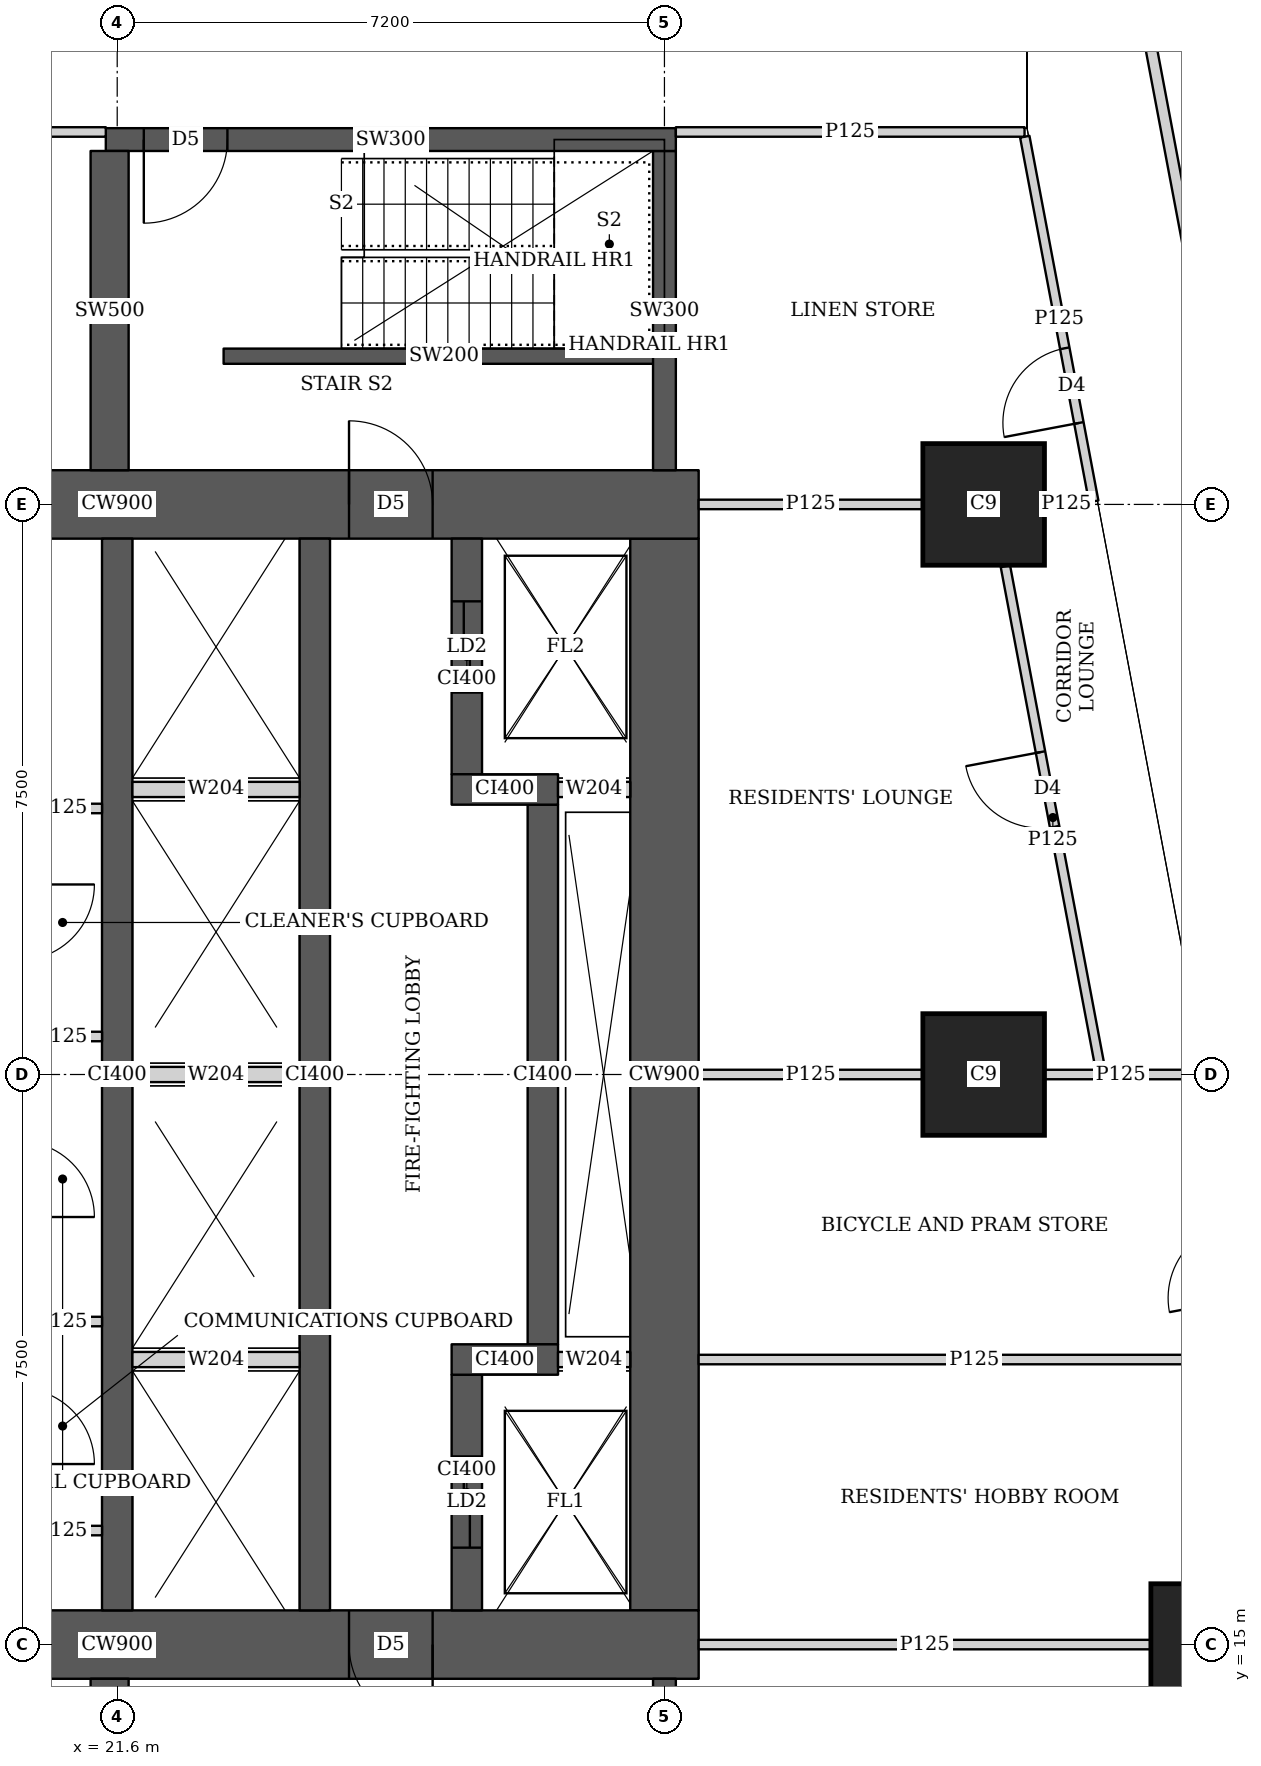
"""IFC4 building model, lengths in metres.
Left out: names, types, materials, properties, quantities, classifications, styles, units other than length and angle.
Written with IfcOpenShell. Run it as: python <this file> out.ifc"""

import sys

from ifc_helpers import new_model, si_unit, direction, frame, frame_2d, origin, origin_2d, place, context, subcontext, project, spatial, rectangle, extrude, element, fill, save


model = new_model("IFC4")
c1 = context("Model", 3, precision=1e-05, world=origin(), true_north=direction((0.0, 1.0)))
c2 = subcontext(c1, "Body", "Model", "MODEL_VIEW")
j1 = project(units=[si_unit("LENGTHUNIT", "METRE"), si_unit("PLANEANGLEUNIT", "RADIAN")], contexts=[c1])
p1 = place(None, origin())
s1 = spatial("IfcSite", under=j1, at=p1, CompositionType="ELEMENT")
p2 = place(p1, origin())
s2 = spatial("IfcBuilding", under=s1, at=p2, CompositionType="ELEMENT")
p3 = place(p2, frame((0.0, 0.0, 81.65)))
s3 = spatial("IfcBuildingStorey", under=s2, at=p3, CompositionType="ELEMENT", Elevation=81.65)
for number, where, z_axis, x_axis in (
    (1, (36.0, 15.0, 0.0), (0.0, 0.0, 1.0), (1.0, 0.0, 0.0)),
    (2, (33.0, 22.5, 0.0), (0.0, 0.0, 1.0), (1.0, 0.0, 0.0)),
    (3, (33.0, 30.0, 0.0), (0.0, 0.0, 1.0), (1.0, 0.0, 0.0)),
):
    element("IfcColumn", number, at=place(p3, frame(where, z_axis=z_axis, x_axis=x_axis)), inside=s3, PredefinedType="COLUMN", context=c2, shape_type="SweptSolid", body=[
        extrude(rectangle(XDim=1.6, YDim=1.6, at=origin_2d()), origin(), (0.0, 0.0, 1.0), 3.75),
    ])
p4 = place(p3, frame((13.95, 15.0, 0.0), z_axis=(0.0, 0.0, 1.0), x_axis=(1.0, 0.0, 0.0)))
e4 = element("IfcWall", 4, at=p4, inside=s3, PredefinedType="SHEAR", context=c2, shape_type="SweptSolid", body=[
    extrude(rectangle(XDim=15.3, YDim=0.9, at=frame_2d((7.65, 0.0))), origin(), (0.0, 0.0, 1.0), 3.75),
])
p5 = place(p4, frame((4.45, 0.0, 0.0)))
e5 = element("IfcOpeningElement", 5, at=p5, cuts=e4, PredefinedType="OPENING", context=c2, shape_type="SweptSolid", body=[
    extrude(rectangle(XDim=1.8, YDim=2.1, at=frame_2d((0.9, 1.05))), frame((0.0, 0.46, 0.0), z_axis=(0.0, -1.0, 0.0), x_axis=(1.0, 0.0, 0.0)), (0.0, 0.0, 1.0), 0.92),
])
p6 = place(p4, frame((10.7, 0.0, 0.0)))
e6 = element("IfcOpeningElement", 6, at=p6, cuts=e4, PredefinedType="OPENING", context=c2, shape_type="SweptSolid", body=[
    extrude(rectangle(XDim=1.1, YDim=2.1, at=frame_2d((0.55, 1.05))), frame((0.0, 0.46, 0.0), z_axis=(0.0, -1.0, 0.0), x_axis=(1.0, 0.0, 0.0)), (0.0, 0.0, 1.0), 0.92),
])
p7 = place(p3, frame((13.95, 30.0, 0.0), z_axis=(0.0, 0.0, 1.0), x_axis=(1.0, 0.0, 0.0)))
e7 = element("IfcWall", 7, at=p7, inside=s3, PredefinedType="SHEAR", context=c2, shape_type="SweptSolid", body=[
    extrude(rectangle(XDim=15.3, YDim=0.9, at=frame_2d((7.65, 0.0))), origin(), (0.0, 0.0, 1.0), 3.75),
])
p8 = place(p7, frame((4.45, 0.0, 0.0)))
e8 = element("IfcOpeningElement", 8, at=p8, cuts=e7, PredefinedType="OPENING", context=c2, shape_type="SweptSolid", body=[
    extrude(rectangle(XDim=1.8, YDim=2.1, at=frame_2d((0.9, 1.05))), frame((0.0, 0.46, 0.0), z_axis=(0.0, -1.0, 0.0), x_axis=(1.0, 0.0, 0.0)), (0.0, 0.0, 1.0), 0.92),
])
p9 = place(p7, frame((10.7, 0.0, 0.0)))
e9 = element("IfcOpeningElement", 9, at=p9, cuts=e7, PredefinedType="OPENING", context=c2, shape_type="SweptSolid", body=[
    extrude(rectangle(XDim=1.1, YDim=2.1, at=frame_2d((0.55, 1.05))), frame((0.0, 0.46, 0.0), z_axis=(0.0, -1.0, 0.0), x_axis=(1.0, 0.0, 0.0)), (0.0, 0.0, 1.0), 0.92),
])
p10 = place(p3, frame((28.8, 15.45, 0.0), z_axis=(0.0, 0.0, 1.0), x_axis=(0.0, 1.0, 0.0)))
e10 = element("IfcWall", 10, at=p10, inside=s3, PredefinedType="SHEAR", context=c2, shape_type="SweptSolid", body=[
    extrude(rectangle(XDim=14.1, YDim=0.9, at=frame_2d((7.05, 0.0))), origin(), (0.0, 0.0, 1.0), 3.75),
])
for number, where, z_axis, x_axis in (
    (11, (21.6, 15.45, 0.0), (0.0, 0.0, 1.0), (0.0, 1.0, 0.0)),
    (12, (24.2, 15.45, 0.0), (0.0, 0.0, 1.0), (0.0, 1.0, 0.0)),
):
    element("IfcWall", number, at=place(p3, frame(where, z_axis=z_axis, x_axis=x_axis)), inside=s3, PredefinedType="SHEAR", context=c2, shape_type="SweptSolid", body=[
        extrude(rectangle(XDim=14.1, YDim=0.4, at=frame_2d((7.05, 0.0))), origin(), (0.0, 0.0, 1.0), 3.75),
    ])
p11 = place(p3, frame((26.2, 15.45, 0.0), z_axis=(0.0, 0.0, 1.0), x_axis=(0.0, 1.0, 0.0)))
e13 = element("IfcWall", 13, at=p11, inside=s3, PredefinedType="SHEAR", context=c2, shape_type="SweptSolid", body=[
    extrude(rectangle(XDim=3.1, YDim=0.4, at=frame_2d((1.55, 0.0))), origin(), (0.0, 0.0, 1.0), 3.75),
])
p12 = place(p11, frame((0.825, 0.0, 0.0)))
e14 = element("IfcOpeningElement", 14, at=p12, cuts=e13, PredefinedType="OPENING", context=c2, shape_type="SweptSolid", body=[
    extrude(rectangle(XDim=1.2, YDim=2.1, at=frame_2d((0.6, 1.05))), frame((0.0, 0.21, 0.0), z_axis=(0.0, -1.0, 0.0), x_axis=(1.0, 0.0, 0.0)), (0.0, 0.0, 1.0), 0.42),
])
p13 = place(p3, frame((26.0, 18.75, 0.0), z_axis=(0.0, 0.0, 1.0), x_axis=(1.0, 0.0, 0.0)))
e15 = element("IfcWall", 15, at=p13, inside=s3, PredefinedType="SHEAR", context=c2, shape_type="SweptSolid", body=[
    extrude(rectangle(XDim=1.4, YDim=0.4, at=frame_2d((0.7, 0.0))), origin(), (0.0, 0.0, 1.0), 3.75),
])
p14 = place(p3, frame((27.2, 18.95, 0.0), z_axis=(0.0, 0.0, 1.0), x_axis=(0.0, 1.0, 0.0)))
e16 = element("IfcWall", 16, at=p14, inside=s3, PredefinedType="SHEAR", context=c2, shape_type="SweptSolid", body=[
    extrude(rectangle(XDim=7.1, YDim=0.4, at=frame_2d((3.55, 0.0))), origin(), (0.0, 0.0, 1.0), 3.75),
])
p15 = place(p3, frame((26.0, 26.25, 0.0), z_axis=(0.0, 0.0, 1.0), x_axis=(1.0, 0.0, 0.0)))
e17 = element("IfcWall", 17, at=p15, inside=s3, PredefinedType="SHEAR", context=c2, shape_type="SweptSolid", body=[
    extrude(rectangle(XDim=1.4, YDim=0.4, at=frame_2d((0.7, 0.0))), origin(), (0.0, 0.0, 1.0), 3.75),
])
p16 = place(p3, frame((26.2, 26.45, 0.0), z_axis=(0.0, 0.0, 1.0), x_axis=(0.0, 1.0, 0.0)))
e18 = element("IfcWall", 18, at=p16, inside=s3, PredefinedType="SHEAR", context=c2, shape_type="SweptSolid", body=[
    extrude(rectangle(XDim=3.1, YDim=0.4, at=frame_2d((1.55, 0.0))), origin(), (0.0, 0.0, 1.0), 3.75),
])
p17 = place(p16, frame((1.075, 0.0, 0.0)))
e19 = element("IfcOpeningElement", 19, at=p17, cuts=e18, PredefinedType="OPENING", context=c2, shape_type="SweptSolid", body=[
    extrude(rectangle(XDim=1.2, YDim=2.1, at=frame_2d((0.6, 1.05))), frame((0.0, 0.21, 0.0), z_axis=(0.0, -1.0, 0.0), x_axis=(1.0, 0.0, 0.0)), (0.0, 0.0, 1.0), 0.42),
])
p18 = place(p3, frame((21.5, 10.35, 0.0), z_axis=(0.0, 0.0, 1.0), x_axis=(0.0, 1.0, 0.0)))
e20 = element("IfcWall", 20, at=p18, inside=s3, PredefinedType="SHEAR", context=c2, shape_type="SweptSolid", body=[
    extrude(rectangle(XDim=4.2, YDim=0.5, at=frame_2d((2.1, 0.0))), origin(), (0.0, 0.0, 1.0), 3.75),
])
p19 = place(p3, frame((28.8, 10.35, 0.0), z_axis=(0.0, 0.0, 1.0), x_axis=(0.0, 1.0, 0.0)))
e21 = element("IfcWall", 21, at=p19, inside=s3, PredefinedType="SHEAR", context=c2, shape_type="SweptSolid", body=[
    extrude(rectangle(XDim=4.2, YDim=0.3, at=frame_2d((2.1, 0.0))), origin(), (0.0, 0.0, 1.0), 3.75),
])
p20 = place(p3, frame((21.45, 34.8, 0.0), z_axis=(0.0, 0.0, 1.0), x_axis=(1.0, 0.0, 0.0)))
e22 = element("IfcWall", 22, at=p20, inside=s3, PredefinedType="SHEAR", context=c2, shape_type="SweptSolid", body=[
    extrude(rectangle(XDim=7.5, YDim=0.3, at=frame_2d((3.75, 0.0))), origin(), (0.0, 0.0, 1.0), 3.75),
])
p21 = place(p20, frame((0.5, 0.0, 0.0)))
e23 = element("IfcOpeningElement", 23, at=p21, cuts=e22, PredefinedType="OPENING", context=c2, shape_type="SweptSolid", body=[
    extrude(rectangle(XDim=1.1, YDim=2.1, at=frame_2d((0.55, 1.05))), frame((0.0, 0.16, 0.0), z_axis=(0.0, -1.0, 0.0), x_axis=(1.0, 0.0, 0.0)), (0.0, 0.0, 1.0), 0.32),
])
p22 = place(p3, frame((21.5, 30.45, 0.0), z_axis=(0.0, 0.0, 1.0), x_axis=(0.0, 1.0, 0.0)))
e24 = element("IfcWall", 24, at=p22, inside=s3, PredefinedType="SHEAR", context=c2, shape_type="SweptSolid", body=[
    extrude(rectangle(XDim=4.2, YDim=0.5, at=frame_2d((2.1, 0.0))), origin(), (0.0, 0.0, 1.0), 3.75),
])
p23 = place(p3, frame((28.8, 30.45, 0.0), z_axis=(0.0, 0.0, 1.0), x_axis=(0.0, 1.0, 0.0)))
e25 = element("IfcWall", 25, at=p23, inside=s3, PredefinedType="SHEAR", context=c2, shape_type="SweptSolid", body=[
    extrude(rectangle(XDim=4.2, YDim=0.3, at=frame_2d((2.1, 0.0))), origin(), (0.0, 0.0, 1.0), 3.75),
])
p24 = place(p3, frame((33.382, 45.65, 0.0), z_axis=(0.0, 0.0, 1.0), x_axis=(0.185593544777, -0.982626600565, 0.0)))
e26 = element("IfcWall", 26, at=p24, inside=s3, PredefinedType="SOLIDWALL", context=c2, shape_type="SweptSolid", body=[
    extrude(rectangle(XDim=47.118, YDim=0.15, at=frame_2d((23.559, 0.0))), origin(), (0.0, 0.0, 1.0), 2.2),
])
p25 = place(p24, frame((19.054, 0.0, 0.0)))
e27 = element("IfcOpeningElement", 27, at=p25, cuts=e26, PredefinedType="OPENING", context=c2, shape_type="SweptSolid", body=[
    extrude(rectangle(XDim=1.0, YDim=2.1, at=frame_2d((0.5, 1.05))), frame((0.0, 0.085, 0.0), z_axis=(0.0, -1.0, 0.0), x_axis=(1.0, 0.0, 0.0)), (0.0, 0.0, 1.0), 0.17),
])
p26 = place(p24, frame((22.87, 0.0, 0.0)))
e28 = element("IfcOpeningElement", 28, at=p26, cuts=e26, PredefinedType="OPENING", context=c2, shape_type="SweptSolid", body=[
    extrude(rectangle(XDim=1.0, YDim=2.1, at=frame_2d((0.5, 1.05))), frame((0.0, 0.085, 0.0), z_axis=(0.0, -1.0, 0.0), x_axis=(1.0, 0.0, 0.0)), (0.0, 0.0, 1.0), 0.17),
])
p27 = place(p24, frame((33.833, 0.0, 0.0)))
e29 = element("IfcOpeningElement", 29, at=p27, cuts=e26, PredefinedType="OPENING", context=c2, shape_type="SweptSolid", body=[
    extrude(rectangle(XDim=1.0, YDim=2.1, at=frame_2d((0.5, 1.05))), frame((0.0, 0.085, 0.0), z_axis=(0.0, -1.0, 0.0), x_axis=(1.0, 0.0, 0.0)), (0.0, 0.0, 1.0), 0.17),
])
p28 = place(p3, frame((10.163, 34.9, 0.0), z_axis=(0.0, 0.0, 1.0), x_axis=(1.0, 0.0, 0.0)))
e30 = element("IfcWall", 30, at=p28, inside=s3, PredefinedType="PARTITIONING", context=c2, shape_type="SweptSolid", body=[
    extrude(rectangle(XDim=11.287, YDim=0.125, at=frame_2d((5.644, 0.0))), origin(), (0.0, 0.0, 1.0), 3.5),
])
p29 = place(p28, frame((7.737, 0.0, 0.0)))
e31 = element("IfcOpeningElement", 31, at=p29, cuts=e30, PredefinedType="OPENING", context=c2, shape_type="SweptSolid", body=[
    extrude(rectangle(XDim=1.8, YDim=2.1, at=frame_2d((0.9, 1.05))), frame((0.0, 0.073, 0.0), z_axis=(0.0, -1.0, 0.0), x_axis=(1.0, 0.0, 0.0)), (0.0, 0.0, 1.0), 0.145),
])
p30 = place(p3, frame((28.95, 34.9, 0.0), z_axis=(0.0, 0.0, 1.0), x_axis=(1.0, 0.0, 0.0)))
e32 = element("IfcWall", 32, at=p30, inside=s3, PredefinedType="PARTITIONING", context=c2, shape_type="SweptSolid", body=[
    extrude(rectangle(XDim=4.588, YDim=0.125, at=frame_2d((2.294, 0.0))), origin(), (0.0, 0.0, 1.0), 3.5),
])
p31 = place(p3, frame((34.448, 30.04, 0.0), z_axis=(0.0, 0.0, 1.0), x_axis=(-0.185749459238, 0.982597139418, 0.0)))
e33 = element("IfcWall", 33, at=p31, inside=s3, PredefinedType="PARTITIONING", context=c2, shape_type="SweptSolid", body=[
    extrude(rectangle(XDim=4.883, YDim=0.125, at=frame_2d((2.441, 0.0))), origin(), (0.0, 0.0, 1.0), 2.5),
])
p32 = place(p31, frame((1.05, 0.0, 0.0)))
e34 = element("IfcOpeningElement", 34, at=p32, cuts=e33, PredefinedType="OPENING", context=c2, shape_type="SweptSolid", body=[
    extrude(rectangle(XDim=1.0, YDim=2.1, at=frame_2d((0.5, 1.05))), frame((0.0, 0.073, 0.0), z_axis=(0.0, -1.0, 0.0), x_axis=(1.0, 0.0, 0.0)), (0.0, 0.0, 1.0), 0.145),
])
p33 = place(p3, frame((34.535, 22.574, 0.0), z_axis=(0.0, 0.0, 1.0), x_axis=(-0.185591596381, 0.982626968566, 0.0)))
e35 = element("IfcWall", 35, at=p33, inside=s3, PredefinedType="PARTITIONING", context=c2, shape_type="SweptSolid", body=[
    extrude(rectangle(XDim=6.73, YDim=0.125, at=frame_2d((3.365, 0.0))), origin(), (0.0, 0.0, 1.0), 2.5),
])
p34 = place(p33, frame((3.241, 0.0, 0.0)))
e36 = element("IfcOpeningElement", 36, at=p34, cuts=e35, PredefinedType="OPENING", context=c2, shape_type="SweptSolid", body=[
    extrude(rectangle(XDim=1.0, YDim=2.1, at=frame_2d((0.5, 1.05))), frame((0.0, 0.073, 0.0), z_axis=(0.0, -1.0, 0.0), x_axis=(1.0, 0.0, 0.0)), (0.0, 0.0, 1.0), 0.145),
])
p35 = place(p3, frame((29.25, 15.0, 0.0), z_axis=(0.0, 0.0, 1.0), x_axis=(1.0, 0.0, 0.0)))
e37 = element("IfcWall", 37, at=p35, inside=s3, PredefinedType="PARTITIONING", context=c2, shape_type="SweptSolid", body=[
    extrude(rectangle(XDim=5.949, YDim=0.125, at=frame_2d((2.975, 0.0))), origin(), (0.0, 0.0, 1.0), 3.5),
])
p36 = place(p3, frame((29.25, 18.75, 0.0), z_axis=(0.0, 0.0, 1.0), x_axis=(1.0, 0.0, 0.0)))
e38 = element("IfcWall", 38, at=p36, inside=s3, PredefinedType="PARTITIONING", context=c2, shape_type="SweptSolid", body=[
    extrude(rectangle(XDim=7.254, YDim=0.125, at=frame_2d((3.627, 0.0))), origin(), (0.0, 0.0, 1.0), 3.5),
])
p37 = place(p3, frame((29.25, 22.5, 0.0), z_axis=(0.0, 0.0, 1.0), x_axis=(1.0, 0.0, 0.0)))
e39 = element("IfcWall", 39, at=p37, inside=s3, PredefinedType="PARTITIONING", context=c2, shape_type="SweptSolid", body=[
    extrude(rectangle(XDim=2.949, YDim=0.125, at=frame_2d((1.475, 0.0))), origin(), (0.0, 0.0, 1.0), 3.5),
])
p38 = place(p3, frame((33.801, 22.5, 0.0), z_axis=(0.0, 0.0, 1.0), x_axis=(1.0, 0.0, 0.0)))
e40 = element("IfcWall", 40, at=p38, inside=s3, PredefinedType="PARTITIONING", context=c2, shape_type="SweptSolid", body=[
    extrude(rectangle(XDim=2.009, YDim=0.125, at=frame_2d((1.004, 0.0))), origin(), (0.0, 0.0, 1.0), 2.5),
])
p39 = place(p3, frame((29.25, 30.0, 0.0), z_axis=(0.0, 0.0, 1.0), x_axis=(1.0, 0.0, 0.0)))
e41 = element("IfcWall", 41, at=p39, inside=s3, PredefinedType="PARTITIONING", context=c2, shape_type="SweptSolid", body=[
    extrude(rectangle(XDim=2.949, YDim=0.125, at=frame_2d((1.475, 0.0))), origin(), (0.0, 0.0, 1.0), 3.5),
])
p40 = place(p3, frame((33.801, 30.0, 0.0), z_axis=(0.0, 0.0, 1.0), x_axis=(1.0, 0.0, 0.0)))
e42 = element("IfcWall", 42, at=p40, inside=s3, PredefinedType="PARTITIONING", context=c2, shape_type="SweptSolid", body=[
    extrude(rectangle(XDim=0.579, YDim=0.125, at=frame_2d((0.29, 0.0))), origin(), (0.0, 0.0, 1.0), 2.5),
])
for number, where, z_axis, x_axis in (
    (43, (20.363, 16.5, 0.0), (0.0, 0.0, 1.0), (1.0, 0.0, 0.0)),
    (44, (20.363, 26.0, 0.0), (0.0, 0.0, 1.0), (1.0, 0.0, 0.0)),
    (45, (20.363, 19.25, 0.0), (0.0, 0.0, 1.0), (1.0, 0.0, 0.0)),
    (46, (20.363, 23.0, 0.0), (0.0, 0.0, 1.0), (1.0, 0.0, 0.0)),
):
    element("IfcWall", number, at=place(p3, frame(where, z_axis=z_axis, x_axis=x_axis)), inside=s3, PredefinedType="PARTITIONING", context=c2, shape_type="SweptSolid", body=[
        extrude(rectangle(XDim=1.037, YDim=0.125, at=frame_2d((0.519, 0.0))), origin(), (0.0, 0.0, 1.0), 3.5),
    ])
p41 = place(p3, frame((23.0, 31.95, 0.0), z_axis=(0.0, 0.0, 1.0), x_axis=(1.0, 0.0, 0.0)))
e47 = element("IfcWall", 47, at=p41, inside=s3, PredefinedType="SHEAR", context=c2, shape_type="SweptSolid", body=[
    extrude(rectangle(XDim=5.8, YDim=0.2, at=frame_2d((2.9, 0.0))), origin(), (0.0, 0.0, 1.0), 3.75),
])
for number, where, z_axis, x_axis in (
    (48, (21.8, 18.75, 0.0), (0.0, 0.0, 1.0), (1.0, 0.0, 0.0)),
    (49, (21.8, 22.5, 0.0), (0.0, 0.0, 1.0), (1.0, 0.0, 0.0)),
    (50, (21.8, 26.25, 0.0), (0.0, 0.0, 1.0), (1.0, 0.0, 0.0)),
):
    element("IfcWall", number, at=place(p3, frame(where, z_axis=z_axis, x_axis=x_axis)), inside=s3, PredefinedType="SOLIDWALL", context=c2, shape_type="SweptSolid", body=[
        extrude(rectangle(XDim=2.2, YDim=0.2, at=frame_2d((1.1, 0.0))), origin(), (0.0, 0.0, 1.0), 3.5),
    ])
for number, where, z_axis, x_axis in (
    (51, (27.4, 18.75, 0.0), (0.0, 0.0, 1.0), (1.0, 0.0, 0.0)),
    (52, (27.4, 26.25, 0.0), (0.0, 0.0, 1.0), (1.0, 0.0, 0.0)),
):
    element("IfcWall", number, at=place(p3, frame(where, z_axis=z_axis, x_axis=x_axis)), inside=s3, PredefinedType="SOLIDWALL", context=c2, shape_type="SweptSolid", body=[
        extrude(rectangle(XDim=0.95, YDim=0.2, at=frame_2d((0.475, 0.0))), origin(), (0.0, 0.0, 1.0), 3.5),
    ])
p42 = place(p34, origin())
e53 = element("IfcDoor", 53, at=p42, inside=s3, OperationType="SINGLE_SWING_RIGHT", PredefinedType="DOOR", context=c2, shape_type="SweptSolid", body=[
    extrude(rectangle(XDim=1.0, YDim=2.1, at=frame_2d((0.5, 1.05))), frame((0.0, 0.025, 0.0), z_axis=(0.0, -1.0, 0.0), x_axis=(1.0, 0.0, 0.0)), (0.0, 0.0, 1.0), 0.05),
])
fill(e36, e53)
p43 = place(p32, origin())
e54 = element("IfcDoor", 54, at=p43, inside=s3, OperationType="SINGLE_SWING_LEFT", PredefinedType="DOOR", context=c2, shape_type="SweptSolid", body=[
    extrude(rectangle(XDim=1.0, YDim=2.1, at=frame_2d((0.5, 1.05))), frame((0.0, 0.025, 0.0), z_axis=(0.0, -1.0, 0.0), x_axis=(1.0, 0.0, 0.0)), (0.0, 0.0, 1.0), 0.05),
])
fill(e34, e54)
p44 = place(p6, origin())
e55 = element("IfcDoor", 55, at=p44, inside=s3, OperationType="SINGLE_SWING_LEFT", PredefinedType="DOOR", context=c2, shape_type="SweptSolid", body=[
    extrude(rectangle(XDim=1.1, YDim=2.1, at=frame_2d((0.55, 1.05))), frame((0.0, 0.025, 0.0), z_axis=(0.0, -1.0, 0.0), x_axis=(1.0, 0.0, 0.0)), (0.0, 0.0, 1.0), 0.05),
])
fill(e6, e55)
p45 = place(p9, origin())
e56 = element("IfcDoor", 56, at=p45, inside=s3, OperationType="SINGLE_SWING_LEFT", PredefinedType="DOOR", context=c2, shape_type="SweptSolid", body=[
    extrude(rectangle(XDim=1.1, YDim=2.1, at=frame_2d((0.55, 1.05))), frame((0.0, 0.025, 0.0), z_axis=(0.0, -1.0, 0.0), x_axis=(1.0, 0.0, 0.0)), (0.0, 0.0, 1.0), 0.05),
])
fill(e9, e56)
p46 = place(p12, origin())
e57 = element("IfcDoor", 57, at=p46, inside=s3, OperationType="DOUBLE_DOOR_SLIDING", PredefinedType="DOOR", context=c2, shape_type="SweptSolid", body=[
    extrude(rectangle(XDim=1.2, YDim=2.1, at=frame_2d((0.6, 1.05))), frame((0.0, 0.025, 0.0), z_axis=(0.0, -1.0, 0.0), x_axis=(1.0, 0.0, 0.0)), (0.0, 0.0, 1.0), 0.05),
])
fill(e14, e57)
p47 = place(p17, origin())
e58 = element("IfcDoor", 58, at=p47, inside=s3, OperationType="DOUBLE_DOOR_SLIDING", PredefinedType="DOOR", context=c2, shape_type="SweptSolid", body=[
    extrude(rectangle(XDim=1.2, YDim=2.1, at=frame_2d((0.6, 1.05))), frame((0.0, 0.025, 0.0), z_axis=(0.0, -1.0, 0.0), x_axis=(1.0, 0.0, 0.0)), (0.0, 0.0, 1.0), 0.05),
])
fill(e19, e58)
p48 = place(p21, origin())
e59 = element("IfcDoor", 59, at=p48, inside=s3, OperationType="SINGLE_SWING_RIGHT", PredefinedType="DOOR", context=c2, shape_type="SweptSolid", body=[
    extrude(rectangle(XDim=1.1, YDim=2.1, at=frame_2d((0.55, 1.05))), frame((0.0, 0.025, 0.0), z_axis=(0.0, -1.0, 0.0), x_axis=(1.0, 0.0, 0.0)), (0.0, 0.0, 1.0), 0.05),
])
fill(e23, e59)
save(model, sys.argv[1])
